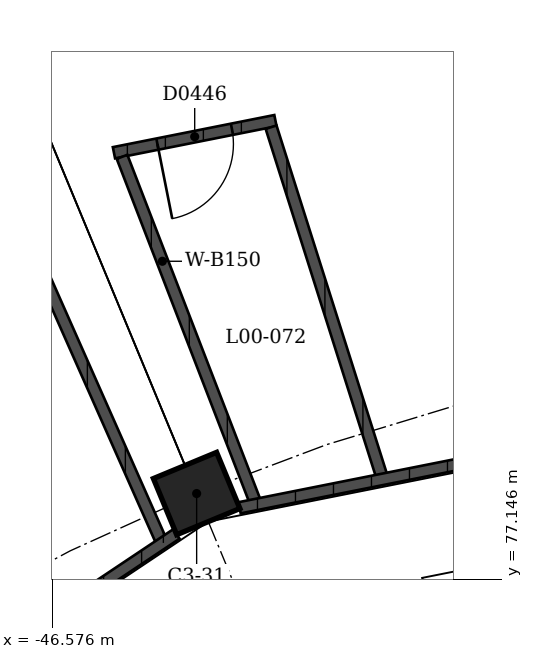
"""IFC4 building model, lengths in metres.
Left out: names, types, materials, properties, quantities, classifications, styles, units other than length and angle.
Written with IfcOpenShell. Run it as: python <this file> out.ifc"""

import sys

from ifc_helpers import new_model, si_unit, direction, frame, frame_2d, origin, origin_2d, place, context, subcontext, project, spatial, rectangle, extrude, element, fill, save


model = new_model("IFC4")
c1 = context("Model", 3, precision=1e-05, world=origin(), true_north=direction((0.0, 1.0)))
c2 = subcontext(c1, "Body", "Model", "MODEL_VIEW")
j1 = project(units=[si_unit("LENGTHUNIT", "METRE"), si_unit("PLANEANGLEUNIT", "RADIAN")], contexts=[c1])
p1 = place(None, origin())
s1 = spatial("IfcSite", under=j1, at=p1, CompositionType="ELEMENT")
p2 = place(p1, origin())
s2 = spatial("IfcBuilding", under=s1, at=p2, CompositionType="ELEMENT")
p3 = place(p2, origin())
s3 = spatial("IfcBuildingStorey", under=s2, at=p3, CompositionType="ELEMENT", Elevation=0.0)
p4 = place(p3, frame((-44.677, 78.276, 0.0), z_axis=(0.0, 0.0, 1.0), x_axis=(-0.923879532511, -0.382683432365, 0.0)))
e1 = element("IfcColumn", 1, at=p4, inside=s3, PredefinedType="COLUMN", context=c2, shape_type="SweptSolid", body=[
    extrude(rectangle(XDim=0.9, YDim=0.8, at=origin_2d()), origin(), (0.0, 0.0, 1.0), 4.5),
])
p5 = place(p3, frame((-46.54, 76.677, 0.0), z_axis=(0.0, 0.0, 1.0), x_axis=(-0.460446193467, 0.887687615618, 0.0)))
e2 = element("IfcWall", 2, at=p5, inside=s3, PredefinedType="SOLIDWALL", context=c2, shape_type="SweptSolid", body=[
    extrude(rectangle(XDim=4.86, YDim=0.15, at=frame_2d((2.43, 0.0))), origin(), (0.0, 0.0, 1.0), 3.0),
])
p6 = place(p3, frame((-45.129, 77.62, 0.0), z_axis=(0.0, 0.0, 1.0), x_axis=(-0.405098626615, 0.914272991352, 0.0)))
e3 = element("IfcWall", 3, at=p6, inside=s3, PredefinedType="SOLIDWALL", context=c2, shape_type="SweptSolid", body=[
    extrude(rectangle(XDim=4.903, YDim=0.15, at=frame_2d((2.451, 0.0))), origin(), (0.0, 0.0, 1.0), 3.0),
])
p7 = place(p3, frame((-43.64, 83.182, 0.0), z_axis=(0.0, 0.0, 1.0), x_axis=(-0.980788176969, -0.195075759432, 0.0)))
e4 = element("IfcWall", 4, at=p7, inside=s3, PredefinedType="SOLIDWALL", context=c2, shape_type="SweptSolid", body=[
    extrude(rectangle(XDim=2.166, YDim=0.15, at=frame_2d((1.083, 0.0))), origin(), (0.0, 0.0, 1.0), 3.0),
])
p8 = place(p7, frame((0.583, 0.0, 0.0)))
e5 = element("IfcOpeningElement", 5, at=p8, cuts=e4, PredefinedType="OPENING", context=c2, shape_type="SweptSolid", body=[
    extrude(rectangle(XDim=1.0, YDim=2.1, at=frame_2d((0.5, 1.05))), frame((0.0, 0.075, 0.0), z_axis=(0.0, -1.0, 0.0), x_axis=(1.0, 0.0, 0.0)), (0.0, 0.0, 1.0), 0.15),
])
p9 = place(p3, frame((-42.229, 78.463, 0.0), z_axis=(0.0, 0.0, 1.0), x_axis=(-0.302162587804, 0.953256403352, 0.0)))
e6 = element("IfcWall", 6, at=p9, inside=s3, PredefinedType="SOLIDWALL", context=c2, shape_type="SweptSolid", body=[
    extrude(rectangle(XDim=4.86, YDim=0.15, at=frame_2d((2.43, 0.0))), origin(), (0.0, 0.0, 1.0), 3.0),
])
p10 = place(p3, frame((-43.893, 78.132, 0.0), z_axis=(0.0, 0.0, 1.0), x_axis=(-0.360073313022, 0.932924010437, 0.0)))
e7 = element("IfcWall", 7, at=p10, inside=s3, PredefinedType="SOLIDWALL", context=c2, shape_type="SweptSolid", body=[
    extrude(rectangle(XDim=4.903, YDim=0.15, at=frame_2d((2.451, 0.0))), origin(), (0.0, 0.0, 1.0), 3.0),
])
p11 = place(p3, frame((-53.135, 72.271, 0.0), z_axis=(0.0, 0.0, 1.0), x_axis=(0.83147031613, 0.555569179667, 0.0)))
e8 = element("IfcWall", 8, at=p11, inside=s3, PredefinedType="SOLIDWALL", context=c2, shape_type="SweptSolid", body=[
    extrude(rectangle(XDim=9.851, YDim=0.15, at=frame_2d((4.926, 0.0))), origin(), (0.0, 0.0, 1.0), 3.0),
])
p12 = place(p3, frame((-44.112, 78.089, 0.0), z_axis=(0.0, 0.0, 1.0), x_axis=(0.980787086023, 0.195081244333, 0.0)))
e9 = element("IfcWall", 9, at=p12, inside=s3, PredefinedType="SOLIDWALL", context=c2, shape_type="SweptSolid", body=[
    extrude(rectangle(XDim=9.8, YDim=0.15, at=frame_2d((4.9, 0.0))), origin(), (0.0, 0.0, 1.0), 3.0),
])
p13 = place(p12, frame((3.756, 0.0, 0.0)))
e10 = element("IfcOpeningElement", 10, at=p13, cuts=e9, PredefinedType="OPENING", context=c2, shape_type="SweptSolid", body=[
    extrude(rectangle(XDim=2.4, YDim=2.4, at=frame_2d((1.2, 1.2))), frame((0.0, 0.075, 0.0), z_axis=(0.0, -1.0, 0.0), x_axis=(1.0, 0.0, 0.0)), (0.0, 0.0, 1.0), 0.15),
])
p14 = place(p8, origin())
e11 = element("IfcDoor", 11, at=p14, inside=s3, OperationType="SINGLE_SWING_LEFT", PredefinedType="DOOR", context=c2, shape_type="SweptSolid", body=[
    extrude(rectangle(XDim=1.0, YDim=2.1, at=frame_2d((0.5, 1.05))), frame((0.0, 0.025, 0.0), z_axis=(0.0, -1.0, 0.0), x_axis=(1.0, 0.0, 0.0)), (0.0, 0.0, 1.0), 0.05),
])
fill(e5, e11)
save(model, sys.argv[1])
